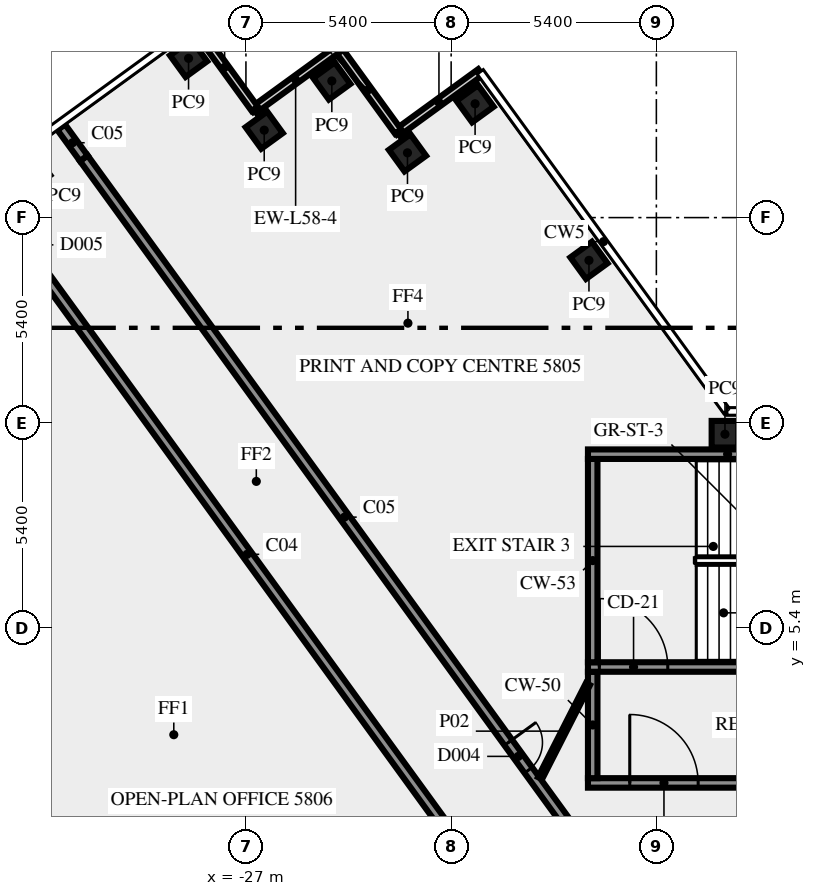
"""IFC4 building model, lengths in metres.
Left out: names, types, materials, properties, quantities, classifications, styles, units other than length and angle.
Written with IfcOpenShell. Run it as: python <this file> out.ifc"""

import sys

from ifc_helpers import new_model, si_unit, direction, frame, frame_2d, origin, origin_2d, place, context, subcontext, project, spatial, rectangle, extrude, element, fill, save


model = new_model("IFC4")
c1 = context("Model", 3, precision=1e-05, world=origin(), true_north=direction((0.0, 1.0)))
c2 = subcontext(c1, "Body", "Model", "MODEL_VIEW")
j1 = project(units=[si_unit("LENGTHUNIT", "METRE"), si_unit("PLANEANGLEUNIT", "RADIAN")], contexts=[c1])
p1 = place(None, origin())
s1 = spatial("IfcSite", under=j1, at=p1, CompositionType="ELEMENT")
p2 = place(p1, origin())
s2 = spatial("IfcBuilding", under=s1, at=p2, CompositionType="ELEMENT")
p3 = place(p2, frame((0.0, 0.0, 248.0)))
s3 = spatial("IfcBuildingStorey", under=s2, at=p3, CompositionType="ELEMENT", Elevation=248.0)
for number, where, z_axis, x_axis in (
    (1, (-17.974, 15.075, 0.0), (0.0, 0.0, 1.0), (-0.588, 0.809, 0.0)),
    (2, (-20.97, 19.195, 0.0), (0.0, 0.0, 1.0), (-0.588, 0.809, 0.0)),
    (3, (-22.749, 17.904, 0.0), (0.0, 0.0, 1.0), (-0.588, 0.809, 0.0)),
    (4, (-24.74, 19.795, 0.0), (0.0, 0.0, 1.0), (-0.588, 0.809, 0.0)),
    (5, (-26.519, 18.5, 0.0), (0.0, 0.0, 1.0), (-0.588, 0.809, 0.0)),
    (6, (-28.51, 20.39, 0.0), (0.0, 0.0, 1.0), (-0.809, -0.588, 0.0)),
    (7, (-14.395, 10.5, 0.0), (0.0, 0.0, 1.0), (-1.0, 0.0, 0.0)),
):
    element("IfcColumn", number, at=place(p3, frame(where, z_axis=z_axis, x_axis=x_axis)), inside=s3, PredefinedType="COLUMN", context=c2, shape_type="SweptSolid", body=[
        extrude(rectangle(XDim=0.7, YDim=0.7, at=origin_2d()), origin(), (0.0, 0.0, 1.0), 4.65),
    ])
for number, where, z_axis, x_axis in (
    (8, (-20.829, 20.025, 0.0), (0.0, 0.0, 1.0), (-0.809, -0.588, 0.0)),
    (9, (-22.996, 18.466, 0.0), (0.0, 0.0, 1.0), (-0.588, 0.809, 0.0)),
):
    element("IfcWall", number, at=place(p3, frame(where, z_axis=z_axis, x_axis=x_axis)), inside=s3, PredefinedType="SOLIDWALL", context=c2, shape_type="SweptSolid", body=[
        extrude(rectangle(XDim=2.7, YDim=0.2, at=frame_2d((1.35, 0.0))), origin(), (0.0, 0.0, 1.0), 4.65),
    ])
for number, where, z_axis, x_axis in (
    (10, (-24.6, 20.623, 0.0), (0.0, 0.0, 1.0), (-0.809, -0.588, 0.0)),
    (11, (-26.768, 19.063, 0.0), (0.0, 0.0, 1.0), (-0.588, 0.809, 0.0)),
):
    element("IfcWall", number, at=place(p3, frame(where, z_axis=z_axis, x_axis=x_axis)), inside=s3, PredefinedType="SOLIDWALL", context=c2, shape_type="SweptSolid", body=[
        extrude(rectangle(XDim=2.7, YDim=0.2, at=frame_2d((1.35, 0.0))), origin(), (0.0, 0.0, 1.0), 4.65),
    ])
p4 = place(p3, frame((-18.0, 1.325, 0.0), z_axis=(0.0, 0.0, 1.0), x_axis=(1.0, 0.0, 0.0)))
e12 = element("IfcWall", 12, at=p4, inside=s3, PredefinedType="SHEAR", context=c2, shape_type="SweptSolid", body=[
    extrude(rectangle(XDim=10.5, YDim=0.25, at=frame_2d((5.25, 0.0))), origin(), (0.0, 0.0, 1.0), 4.65),
])
p5 = place(p4, frame((1.1, 0.0, 0.0)))
e13 = element("IfcOpeningElement", 13, at=p5, cuts=e12, PredefinedType="OPENING", context=c2, shape_type="SweptSolid", body=[
    extrude(rectangle(XDim=1.8, YDim=2.1, at=frame_2d((0.9, 1.05))), frame((0.0, 0.135, 0.0), z_axis=(0.0, -1.0, 0.0), x_axis=(1.0, 0.0, 0.0)), (0.0, 0.0, 1.0), 0.27),
])
p6 = place(p3, frame((-17.875, 1.45, 0.0), z_axis=(0.0, 0.0, 1.0), x_axis=(0.0, 1.0, 0.0)))
e14 = element("IfcWall", 14, at=p6, inside=s3, PredefinedType="SHEAR", context=c2, shape_type="SweptSolid", body=[
    extrude(rectangle(XDim=2.8, YDim=0.25, at=frame_2d((1.4, 0.0))), origin(), (0.0, 0.0, 1.0), 4.65),
])
p7 = place(p3, frame((-18.0, 4.375, 0.0), z_axis=(0.0, 0.0, 1.0), x_axis=(1.0, 0.0, 0.0)))
e15 = element("IfcWall", 15, at=p7, inside=s3, PredefinedType="SHEAR", context=c2, shape_type="SweptSolid", body=[
    extrude(rectangle(XDim=10.5, YDim=0.25, at=frame_2d((5.25, 0.0))), origin(), (0.0, 0.0, 1.0), 4.65),
])
p8 = place(p7, frame((0.3, 0.0, 0.0)))
e16 = element("IfcOpeningElement", 16, at=p8, cuts=e15, PredefinedType="OPENING", context=c2, shape_type="SweptSolid", body=[
    extrude(rectangle(XDim=1.8, YDim=2.1, at=frame_2d((0.9, 1.05))), frame((0.0, 0.135, 0.0), z_axis=(0.0, -1.0, 0.0), x_axis=(1.0, 0.0, 0.0)), (0.0, 0.0, 1.0), 0.27),
])
p9 = place(p3, frame((-17.875, 4.5, 0.0), z_axis=(0.0, 0.0, 1.0), x_axis=(0.0, 1.0, 0.0)))
e17 = element("IfcWall", 17, at=p9, inside=s3, PredefinedType="SHEAR", context=c2, shape_type="SweptSolid", body=[
    extrude(rectangle(XDim=5.35, YDim=0.25, at=frame_2d((2.675, 0.0))), origin(), (0.0, 0.0, 1.0), 4.65),
])
p10 = place(p3, frame((-18.0, 9.975, 0.0), z_axis=(0.0, 0.0, 1.0), x_axis=(1.0, 0.0, 0.0)))
e18 = element("IfcWall", 18, at=p10, inside=s3, PredefinedType="SHEAR", context=c2, shape_type="SweptSolid", body=[
    extrude(rectangle(XDim=10.5, YDim=0.25, at=frame_2d((5.25, 0.0))), origin(), (0.0, 0.0, 1.0), 4.65),
])
p11 = place(p10, frame((4.5, 0.0, 1.0)))
e19 = element("IfcOpeningElement", 19, at=p11, cuts=e18, PredefinedType="OPENING", context=c2, shape_type="SweptSolid", body=[
    extrude(rectangle(XDim=1.2, YDim=1.2, at=frame_2d((0.6, 0.6))), frame((0.0, 0.135, 0.0), z_axis=(0.0, -1.0, 0.0), x_axis=(1.0, 0.0, 0.0)), (0.0, 0.0, 1.0), 0.27),
])
p12 = place(p3, frame((-20.531, -1.523, 0.0), z_axis=(0.0, 0.0, 1.0), x_axis=(-0.587786711753, 0.809015934013, 0.0)))
e20 = element("IfcWall", 20, at=p12, inside=s3, PredefinedType="SOLIDWALL", context=c2, shape_type="SweptSolid", body=[
    extrude(rectangle(XDim=21.911, YDim=0.25, at=frame_2d((10.956, 0.0))), origin(), (0.0, 0.0, 1.0), 4.65),
])
p13 = place(p12, frame((20.571, 0.0, 0.0)))
e21 = element("IfcOpeningElement", 21, at=p13, cuts=e20, PredefinedType="OPENING", context=c2, shape_type="SweptSolid", body=[
    extrude(rectangle(XDim=0.9, YDim=2.1, at=frame_2d((0.45, 1.05))), frame((0.0, 0.135, 0.0), z_axis=(0.0, -1.0, 0.0), x_axis=(1.0, 0.0, 0.0)), (0.0, 0.0, 1.0), 0.27),
])
p14 = place(p3, frame((-31.267, 17.762, 0.0), z_axis=(0.0, 0.0, 1.0), x_axis=(0.587787966774, -0.809015022181, 0.0)))
e22 = element("IfcWall", 22, at=p14, inside=s3, PredefinedType="SOLIDWALL", context=c2, shape_type="SweptSolid", body=[
    extrude(rectangle(XDim=23.345, YDim=0.25, at=frame_2d((11.672, 0.0))), origin(), (0.0, 0.0, 1.0), 4.65),
])
p15 = place(p14, frame((19.004, 0.0, 0.0)))
e23 = element("IfcOpeningElement", 23, at=p15, cuts=e22, PredefinedType="OPENING", context=c2, shape_type="SweptSolid", body=[
    extrude(rectangle(XDim=0.9, YDim=2.1, at=frame_2d((0.45, 1.05))), frame((0.0, 0.135, 0.0), z_axis=(0.0, -1.0, 0.0), x_axis=(1.0, 0.0, 0.0)), (0.0, 0.0, 1.0), 0.27),
])
p16 = place(p3, frame((-19.261, 1.45, 0.0), z_axis=(0.0, 0.0, 1.0), x_axis=(0.453950796792, 0.891026752736, 0.0)))
e24 = element("IfcWall", 24, at=p16, inside=s3, PredefinedType="PARTITIONING", context=c2, shape_type="SweptSolid", body=[
    extrude(rectangle(XDim=2.778, YDim=0.12, at=frame_2d((1.389, 0.0))), origin(), (0.0, 0.0, 1.0), 4.65),
])
p17 = place(p3, frame((-31.267, 17.762, 0.0), z_axis=(0.0, 0.0, 1.0), x_axis=(-0.587840411638, 0.808976915892, 0.0)))
e25 = element("IfcWall", 25, at=p17, inside=s3, PredefinedType="SOLIDWALL", context=c2, shape_type="SweptSolid", body=[
    extrude(rectangle(XDim=1.008, YDim=0.25, at=frame_2d((0.504, 0.0))), origin(), (0.0, 0.0, 1.0), 3.95),
])
p18 = place(p5, origin())
e26 = element("IfcDoor", 26, at=p18, inside=s3, OperationType="DOUBLE_DOOR_SINGLE_SWING", PredefinedType="DOOR", context=c2, shape_type="SweptSolid", body=[
    extrude(rectangle(XDim=1.8, YDim=2.1, at=frame_2d((0.9, 1.05))), frame((0.0, 0.025, 0.0), z_axis=(0.0, -1.0, 0.0), x_axis=(1.0, 0.0, 0.0)), (0.0, 0.0, 1.0), 0.05),
])
fill(e13, e26)
p19 = place(p8, origin())
e27 = element("IfcDoor", 27, at=p19, inside=s3, OperationType="DOUBLE_DOOR_SINGLE_SWING", PredefinedType="DOOR", context=c2, shape_type="SweptSolid", body=[
    extrude(rectangle(XDim=1.8, YDim=2.1, at=frame_2d((0.9, 1.05))), frame((0.0, 0.025, 0.0), z_axis=(0.0, -1.0, 0.0), x_axis=(1.0, 0.0, 0.0)), (0.0, 0.0, 1.0), 0.05),
])
fill(e16, e27)
p20 = place(p15, origin())
e28 = element("IfcDoor", 28, at=p20, inside=s3, OperationType="SINGLE_SWING_RIGHT", PredefinedType="DOOR", context=c2, shape_type="SweptSolid", body=[
    extrude(rectangle(XDim=0.9, YDim=2.1, at=frame_2d((0.45, 1.05))), frame((0.0, 0.025, 0.0), z_axis=(0.0, -1.0, 0.0), x_axis=(1.0, 0.0, 0.0)), (0.0, 0.0, 1.0), 0.05),
])
fill(e23, e28)
save(model, sys.argv[1])
